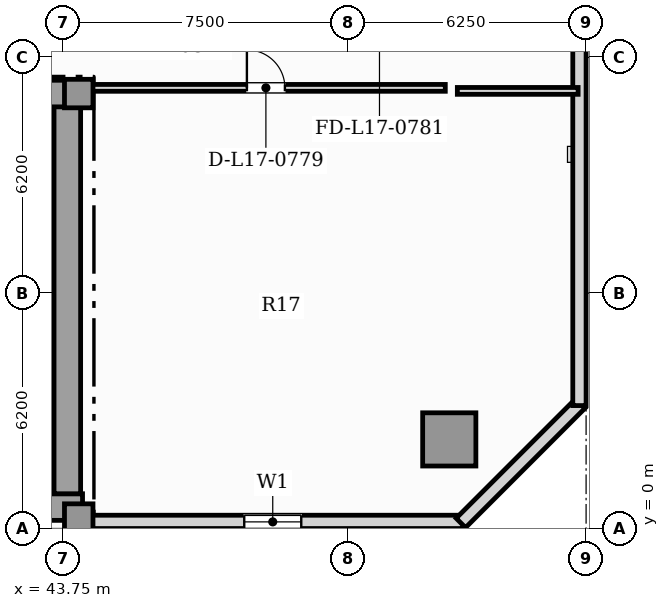
"""IFC4 building model, lengths in metres.
Left out: names, types, materials, properties, quantities, classifications, styles, units other than length and angle.
Written with IfcOpenShell. Run it as: python <this file> out.ifc"""

import sys

from ifc_helpers import new_model, si_unit, direction, frame, frame_2d, origin, origin_2d, place, context, subcontext, project, spatial, rectangle, hollow_rectangle, extrude, element, fill, save


model = new_model("IFC4")
c1 = context("Model", 3, precision=1e-05, world=origin(), true_north=direction((0.0, 1.0)))
c2 = subcontext(c1, "Body", "Model", "MODEL_VIEW")
j1 = project(units=[si_unit("LENGTHUNIT", "METRE"), si_unit("PLANEANGLEUNIT", "RADIAN")], contexts=[c1])
p1 = place(None, origin())
s1 = spatial("IfcSite", under=j1, at=p1, CompositionType="ELEMENT")
p2 = place(p1, origin())
s2 = spatial("IfcBuilding", under=s1, at=p2, CompositionType="ELEMENT")
p3 = place(p2, frame((0.0, 0.0, 72.15)))
s3 = spatial("IfcBuildingStorey", under=s2, at=p3, CompositionType="ELEMENT", Elevation=72.15)
p4 = place(p3, frame((13.25, 0.57, 0.0), z_axis=(0.0, 0.0, 1.0), x_axis=(1.0, 0.0, 0.0)))
e1 = element("IfcWall", 1, at=p4, inside=s3, PredefinedType="SHEAR", context=c2, shape_type="SweptSolid", body=[
    extrude(rectangle(XDim=31.0, YDim=0.7, at=frame_2d((15.5, 0.0))), origin(), (0.0, 0.0, 1.0), 3.57),
])
p5 = place(p3, frame((43.85, 0.92, 0.0), z_axis=(0.0, 0.0, 1.0), x_axis=(0.0, 1.0, 0.0)))
e2 = element("IfcWall", 2, at=p5, inside=s3, PredefinedType="SHEAR", context=c2, shape_type="SweptSolid", body=[
    extrude(rectangle(XDim=10.53, YDim=0.7, at=frame_2d((5.265, 0.0))), origin(), (0.0, 0.0, 1.0), 3.57),
])
p6 = place(p3, frame((41.3, 11.45, 0.0), z_axis=(0.0, 0.0, 1.0), x_axis=(1.0, 0.0, 0.0)))
e3 = element("IfcWall", 3, at=p6, inside=s3, PredefinedType="SHEAR", context=c2, shape_type="SweptSolid", body=[
    extrude(rectangle(XDim=2.95, YDim=0.7, at=frame_2d((1.475, 0.0))), origin(), (0.0, 0.0, 1.0), 3.57),
])
for number, where, z_axis, x_axis in (
    (4, (44.15, 0.28, 0.0), (0.0, 0.0, 1.0), (1.0, 0.0, 0.0)),
    (5, (44.15, 11.45, 0.0), (0.0, 0.0, 1.0), (1.0, 0.0, 0.0)),
):
    element("IfcColumn", number, at=place(p3, frame(where, z_axis=z_axis, x_axis=x_axis)), inside=s3, PredefinedType="COLUMN", context=c2, shape_type="SweptSolid", body=[
        extrude(rectangle(XDim=0.75, YDim=0.75, at=origin_2d()), origin(), (0.0, 0.0, 1.0), 3.85),
    ])
p7 = place(p3, frame((53.9, 2.35, 0.0), z_axis=(0.0, 0.0, 1.0), x_axis=(1.0, 0.0, 0.0)))
e6 = element("IfcColumn", 6, at=p7, inside=s3, PredefinedType="USERDEFINED", context=c2, shape_type="SweptSolid", body=[
    extrude(hollow_rectangle(XDim=1.4, YDim=1.4, WallThickness=0.08, at=origin_2d()), origin(), (0.0, 0.0, 1.0), 3.85),
])
p8 = place(p3, frame((44.25, 0.18, 0.0), z_axis=(0.0, 0.0, 1.0), x_axis=(1.0, 0.0, 0.0)))
e7 = element("IfcWall", 7, at=p8, inside=s3, PredefinedType="SOLIDWALL", context=c2, shape_type="SweptSolid", body=[
    extrude(rectangle(XDim=10.01, YDim=0.35, at=frame_2d((5.005, 0.0))), origin(), (0.0, 0.0, 1.0), 3.57),
])
p9 = place(p8, frame((4.255, 0.0, 0.9)))
e8 = element("IfcOpeningElement", 8, at=p9, cuts=e7, PredefinedType="OPENING", context=c2, shape_type="SweptSolid", body=[
    extrude(rectangle(XDim=1.5, YDim=1.95, at=frame_2d((0.75, 0.975))), frame((0.0, 0.185, 0.0), z_axis=(0.0, -1.0, 0.0), x_axis=(1.0, 0.0, 0.0)), (0.0, 0.0, 1.0), 0.37),
])
p10 = place(p3, frame((54.205, 0.152, 0.0), z_axis=(0.0, 0.0, 1.0), x_axis=(0.707106781187, 0.707106781187, 0.0)))
e9 = element("IfcWall", 9, at=p10, inside=s3, PredefinedType="SOLIDWALL", context=c2, shape_type="SweptSolid", body=[
    extrude(rectangle(XDim=4.445, YDim=0.35, at=frame_2d((2.223, 0.0))), origin(), (0.0, 0.0, 1.0), 3.57),
])
p11 = place(p3, frame((57.325, 3.24, 0.0), z_axis=(0.0, 0.0, 1.0), x_axis=(0.0, 1.0, 0.0)))
e10 = element("IfcWall", 10, at=p11, inside=s3, PredefinedType="SOLIDWALL", context=c2, shape_type="SweptSolid", body=[
    extrude(rectangle(XDim=39.92, YDim=0.35, at=frame_2d((19.96, 0.0))), origin(), (0.0, 0.0, 1.0), 3.57),
])
p12 = place(p11, frame((35.68, 0.0, 0.95)))
e11 = element("IfcOpeningElement", 11, at=p12, cuts=e10, PredefinedType="OPENING", context=c2, shape_type="SweptSolid", body=[
    extrude(rectangle(XDim=0.9, YDim=1.5, at=frame_2d((0.45, 0.75))), frame((0.0, 0.185, 0.0), z_axis=(0.0, -1.0, 0.0), x_axis=(1.0, 0.0, 0.0)), (0.0, 0.0, 1.0), 0.37),
])
p13 = place(p11, frame((11.929, 0.0, 0.9)))
e12 = element("IfcOpeningElement", 12, at=p13, cuts=e10, PredefinedType="OPENING", context=c2, shape_type="SweptSolid", body=[
    extrude(rectangle(XDim=1.5, YDim=1.95, at=frame_2d((0.75, 0.975))), frame((0.0, 0.185, 0.0), z_axis=(0.0, -1.0, 0.0), x_axis=(1.0, 0.0, 0.0)), (0.0, 0.0, 1.0), 0.37),
])
p14 = place(p11, frame((24.354, 0.0, 0.9)))
e13 = element("IfcOpeningElement", 13, at=p14, cuts=e10, PredefinedType="OPENING", context=c2, shape_type="SweptSolid", body=[
    extrude(rectangle(XDim=1.5, YDim=1.95, at=frame_2d((0.75, 0.975))), frame((0.0, 0.185, 0.0), z_axis=(0.0, -1.0, 0.0), x_axis=(1.0, 0.0, 0.0)), (0.0, 0.0, 1.0), 0.37),
])
p15 = place(p11, frame((37.65, 0.0, 0.9)))
e14 = element("IfcOpeningElement", 14, at=p15, cuts=e10, PredefinedType="OPENING", context=c2, shape_type="SweptSolid", body=[
    extrude(rectangle(XDim=1.5, YDim=1.95, at=frame_2d((0.75, 0.975))), frame((0.0, 0.185, 0.0), z_axis=(0.0, -1.0, 0.0), x_axis=(1.0, 0.0, 0.0)), (0.0, 0.0, 1.0), 0.37),
])
p16 = place(p3, frame((40.06, 8.52, 0.0), z_axis=(0.0, 0.0, 1.0), x_axis=(1.0, 0.0, 0.0)))
e15 = element("IfcWall", 15, at=p16, inside=s3, PredefinedType="SOLIDWALL", context=c2, shape_type="SweptSolid", body=[
    extrude(rectangle(XDim=3.4, YDim=0.22, at=frame_2d((1.7, 0.0))), origin(), (0.0, 0.0, 1.0), 3.57),
])
p17 = place(p16, frame((1.125, 0.0, 0.0)))
e16 = element("IfcOpeningElement", 16, at=p17, cuts=e15, PredefinedType="OPENING", context=c2, shape_type="SweptSolid", body=[
    extrude(rectangle(XDim=1.15, YDim=2.2, at=frame_2d((0.575, 1.1))), frame((0.0, 0.12, 0.0), z_axis=(0.0, -1.0, 0.0), x_axis=(1.0, 0.0, 0.0)), (0.0, 0.0, 1.0), 0.24),
])
p18 = place(p3, frame((44.355, 11.6, 0.0), z_axis=(0.0, 0.0, 1.0), x_axis=(1.0, 0.0, 0.0)))
e17 = element("IfcWall", 17, at=p18, inside=s3, PredefinedType="PARTITIONING", context=c2, shape_type="SweptSolid", body=[
    extrude(rectangle(XDim=9.44, YDim=0.18, at=frame_2d((4.72, 0.0))), origin(), (0.0, 0.0, 1.0), 3.57),
])
p19 = place(p18, frame((4.22, 0.0, 0.0)))
e18 = element("IfcOpeningElement", 18, at=p19, cuts=e17, PredefinedType="OPENING", context=c2, shape_type="SweptSolid", body=[
    extrude(rectangle(XDim=1.0, YDim=2.15, at=frame_2d((0.5, 1.075))), frame((0.0, 0.1, 0.0), z_axis=(0.0, -1.0, 0.0), x_axis=(1.0, 0.0, 0.0)), (0.0, 0.0, 1.0), 0.2),
])
p20 = place(p3, frame((54.112, 11.52, 0.0), z_axis=(0.0, 0.0, 1.0), x_axis=(1.0, 0.0, 0.0)))
e19 = element("IfcWall", 19, at=p20, inside=s3, PredefinedType="PARTITIONING", context=c2, shape_type="SweptSolid", body=[
    extrude(rectangle(XDim=3.178, YDim=0.18, at=frame_2d((1.589, 0.0))), origin(), (0.0, 0.0, 1.0), 3.57),
])
p21 = place(p9, origin())
e20 = element("IfcWindow", 20, at=p21, inside=s3, PartitioningType="SINGLE_PANEL", PredefinedType="WINDOW", context=c2, shape_type="SweptSolid", body=[
    extrude(rectangle(XDim=1.5, YDim=1.95, at=frame_2d((0.75, 0.975))), frame((0.0, 0.03, 0.0), z_axis=(0.0, -1.0, 0.0), x_axis=(1.0, 0.0, 0.0)), (0.0, 0.0, 1.0), 0.06),
])
fill(e8, e20)
p22 = place(p19, origin())
e21 = element("IfcDoor", 21, at=p22, inside=s3, OperationType="SINGLE_SWING_LEFT", PredefinedType="DOOR", context=c2, shape_type="SweptSolid", body=[
    extrude(rectangle(XDim=1.0, YDim=2.15, at=frame_2d((0.5, 1.075))), frame((0.0, 0.025, 0.0), z_axis=(0.0, -1.0, 0.0), x_axis=(1.0, 0.0, 0.0)), (0.0, 0.0, 1.0), 0.05),
])
fill(e18, e21)
save(model, sys.argv[1])
